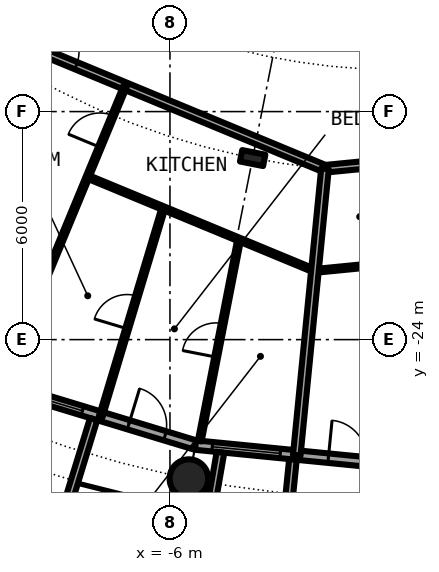
"""IFC4 building model, lengths in metres.
Left out: names, types, materials, properties, quantities, classifications, styles, units other than length and angle.
Written with IfcOpenShell. Run it as: python <this file> out.ifc"""

import sys

from ifc_helpers import new_model, si_unit, direction, frame, frame_2d, origin, origin_2d, place, context, subcontext, project, spatial, rectangle, circle, hollow_circle, i_section, extrude, element, fill, save


model = new_model("IFC4")
c1 = context("Model", 3, precision=1e-05, world=origin(), true_north=direction((0.0, 1.0)))
c2 = subcontext(c1, "Body", "Model", "MODEL_VIEW")
j1 = project(units=[si_unit("LENGTHUNIT", "METRE"), si_unit("PLANEANGLEUNIT", "RADIAN")], contexts=[c1])
p1 = place(None, origin())
s1 = spatial("IfcSite", under=j1, at=p1, CompositionType="ELEMENT")
p2 = place(p1, origin())
s2 = spatial("IfcBuilding", under=s1, at=p2, CompositionType="ELEMENT")
p3 = place(p2, frame((0.0, 0.0, 47.2)))
s3 = spatial("IfcBuildingStorey", under=s2, at=p3, CompositionType="ELEMENT", Elevation=47.2)
p4 = place(p3, frame((-5.501, -27.658, 0.0), z_axis=(0.0, 0.0, 1.0), x_axis=(1.0, 0.0, 0.0)))
e1 = element("IfcColumn", 1, at=p4, inside=s3, PredefinedType="COLUMN", context=c2, shape_type="SweptSolid", body=[
    extrude(hollow_circle(Radius=0.508, WallThickness=0.05, at=origin_2d()), origin(), (0.0, 0.0, 1.0), 3.05),
])
p5 = place(p3, frame((-3.824, -19.223, 0.0), z_axis=(0.0, 0.0, 1.0), x_axis=(-0.195090322016, -0.980785280403, 0.0)))
e2 = element("IfcColumn", 2, at=p5, inside=s3, PredefinedType="COLUMN", context=c2, shape_type="SweptSolid", body=[
    extrude(i_section(OverallWidth=0.305, OverallDepth=0.62, WebThickness=0.021, FlangeThickness=0.04, FilletRadius=0.027, at=origin_2d()), origin(), (0.0, 0.0, 1.0), 3.05),
])
p6 = place(p3, frame((-10.447, -25.222, 0.0), z_axis=(0.0, 0.0, 1.0), x_axis=(0.956965678721, -0.290201119486, 0.0)))
e3 = element("IfcWall", 3, at=p6, inside=s3, PredefinedType="SOLIDWALL", context=c2, shape_type="SweptSolid", body=[
    extrude(rectangle(XDim=5.351, YDim=0.25, at=frame_2d((2.676, 0.0))), origin(), (0.0, 0.0, 1.0), 2.7),
])
p7 = place(p6, frame((0.441, 0.0, 0.3)))
e4 = element("IfcOpeningElement", 4, at=p7, cuts=e3, PredefinedType="OPENING", context=c2, shape_type="SweptSolid", body=[
    extrude(rectangle(XDim=1.8, YDim=2.1, at=frame_2d((0.9, 1.05))), frame((0.0, 0.135, 0.0), z_axis=(0.0, -1.0, 0.0), x_axis=(1.0, 0.0, 0.0)), (0.0, 0.0, 1.0), 0.27),
])
p8 = place(p6, frame((3.51, 0.0, 0.0)))
e5 = element("IfcOpeningElement", 5, at=p8, cuts=e3, PredefinedType="OPENING", context=c2, shape_type="SweptSolid", body=[
    extrude(rectangle(XDim=1.0, YDim=2.2, at=frame_2d((0.5, 1.1))), frame((0.0, 0.135, 0.0), z_axis=(0.0, -1.0, 0.0), x_axis=(1.0, 0.0, 0.0)), (0.0, 0.0, 1.0), 0.27),
])
p9 = place(p3, frame((-11.638, -28.084, -0.03), z_axis=(0.0, 0.0, 1.0), x_axis=(0.941461077774, -0.337121697664, 0.0)))
e6 = element("IfcWall", 6, at=p9, inside=s3, PredefinedType="SOLIDWALL", context=c2, shape_type="SweptSolid", body=[
    extrude(rectangle(XDim=2.993, YDim=0.2, at=frame_2d((1.497, 0.0))), origin(), (0.0, 0.0, 1.0), 2.73),
])
p10 = place(p9, frame((0.457, 0.0, 0.33)))
e7 = element("IfcOpeningElement", 7, at=p10, cuts=e6, PredefinedType="OPENING", context=c2, shape_type="SweptSolid", body=[
    extrude(circle(Radius=1.04, at=frame_2d((1.04, 1.04))), frame((0.0, 0.11, 0.0), z_axis=(0.0, -1.0, 0.0), x_axis=(1.0, 0.0, 0.0)), (0.0, 0.0, 1.0), 0.22),
])
p11 = place(p3, frame((-8.009, -26.092, -0.03), z_axis=(0.0, 0.0, 1.0), x_axis=(-0.293406695073, -0.955987715029, 0.0)))
e8 = element("IfcWall", 8, at=p11, inside=s3, PredefinedType="SOLIDWALL", context=c2, shape_type="SweptSolid", body=[
    extrude(rectangle(XDim=3.006, YDim=0.2, at=frame_2d((1.503, 0.0))), origin(), (0.0, 0.0, 1.0), 2.73),
])
p12 = place(p3, frame((-5.326, -26.775, 0.0), z_axis=(0.0, 0.0, 1.0), x_axis=(0.995173996315, -0.098126026407, 0.0)))
e9 = element("IfcWall", 9, at=p12, inside=s3, PredefinedType="SOLIDWALL", context=c2, shape_type="SweptSolid", body=[
    extrude(rectangle(XDim=5.352, YDim=0.25, at=frame_2d((2.676, 0.0))), origin(), (0.0, 0.0, 1.0), 2.7),
])
p13 = place(p12, frame((0.441, 0.0, 0.3)))
e10 = element("IfcOpeningElement", 10, at=p13, cuts=e9, PredefinedType="OPENING", context=c2, shape_type="SweptSolid", body=[
    extrude(rectangle(XDim=1.8, YDim=2.1, at=frame_2d((0.9, 1.05))), frame((0.0, 0.135, 0.0), z_axis=(0.0, -1.0, 0.0), x_axis=(1.0, 0.0, 0.0)), (0.0, 0.0, 1.0), 0.27),
])
p14 = place(p12, frame((3.51, 0.0, 0.0)))
e11 = element("IfcOpeningElement", 11, at=p14, cuts=e9, PredefinedType="OPENING", context=c2, shape_type="SweptSolid", body=[
    extrude(rectangle(XDim=1.0, YDim=2.2, at=frame_2d((0.5, 1.1))), frame((0.0, 0.135, 0.0), z_axis=(0.0, -1.0, 0.0), x_axis=(1.0, 0.0, 0.0)), (0.0, 0.0, 1.0), 0.27),
])
p15 = place(p3, frame((-4.671, -26.966, -0.03), z_axis=(0.0, 0.0, 1.0), x_axis=(-0.170539878907, -0.985350774954, 0.0)))
e12 = element("IfcWall", 12, at=p15, inside=s3, PredefinedType="SOLIDWALL", context=c2, shape_type="SweptSolid", body=[
    extrude(rectangle(XDim=2.932, YDim=0.2, at=frame_2d((1.466, 0.0))), origin(), (0.0, 0.0, 1.0), 2.73),
])
p16 = place(p3, frame((-2.764, -27.153, -0.03), z_axis=(0.0, 0.0, 1.0), x_axis=(-0.101505487237, -0.994834979311, 0.0)))
e13 = element("IfcWall", 13, at=p16, inside=s3, PredefinedType="SOLIDWALL", context=c2, shape_type="SweptSolid", body=[
    extrude(rectangle(XDim=3.007, YDim=0.2, at=frame_2d((1.503, 0.0))), origin(), (0.0, 0.0, 1.0), 2.73),
])
p17 = place(p3, frame((-2.196, -22.193, 0.0), z_axis=(0.0, 0.0, 1.0), x_axis=(0.995193648169, 0.097926516552, 0.0)))
e14 = element("IfcWall", 14, at=p17, inside=s3, PredefinedType="PARTITIONING", context=c2, shape_type="SweptSolid", body=[
    extrude(rectangle(XDim=2.177, YDim=0.1, at=frame_2d((1.088, 0.0))), origin(), (0.0, 0.0, 1.0), 2.7),
])
p18 = place(p3, frame((-8.164, -19.716, 0.0), z_axis=(0.0, 0.0, 1.0), x_axis=(0.92387253274, -0.38270033087, 0.0)))
e15 = element("IfcWall", 15, at=p18, inside=s3, PredefinedType="PARTITIONING", context=c2, shape_type="SweptSolid", body=[
    extrude(rectangle(XDim=6.475, YDim=0.1, at=frame_2d((3.238, 0.0))), origin(), (0.0, 0.0, 1.0), 2.7),
])
p19 = place(p3, frame((-1.927, -19.506, 0.0), z_axis=(0.0, 0.0, 1.0), x_axis=(0.995181086618, 0.098054091383, 0.0)))
e16 = element("IfcWall", 16, at=p19, inside=s3, PredefinedType="PARTITIONING", context=c2, shape_type="SweptSolid", body=[
    extrude(rectangle(XDim=5.57, YDim=0.2, at=frame_2d((2.785, 0.0))), origin(), (0.0, 0.0, 1.0), 2.38),
])
p20 = place(p19, frame((4.168, 0.0, 0.0)))
e17 = element("IfcOpeningElement", 17, at=p20, cuts=e16, PredefinedType="OPENING", context=c2, shape_type="SweptSolid", body=[
    extrude(rectangle(XDim=1.0, YDim=2.3, at=frame_2d((0.5, 1.15))), frame((0.0, 0.11, 0.0), z_axis=(0.0, -1.0, 0.0), x_axis=(1.0, 0.0, 0.0)), (0.0, 0.0, 1.0), 0.22),
])
p21 = place(p3, frame((-12.434, -15.151, 0.0), z_axis=(0.0, 0.0, 1.0), x_axis=(0.923888467236, -0.382661861319, 0.0)))
e18 = element("IfcWall", 18, at=p21, inside=s3, PredefinedType="PARTITIONING", context=c2, shape_type="SweptSolid", body=[
    extrude(rectangle(XDim=11.381, YDim=0.2, at=frame_2d((5.691, 0.0))), origin(), (0.0, 0.0, 1.0), 2.7),
])
p22 = place(p21, frame((3.292, 0.0, 0.0)))
e19 = element("IfcOpeningElement", 19, at=p22, cuts=e18, PredefinedType="OPENING", context=c2, shape_type="SweptSolid", body=[
    extrude(rectangle(XDim=1.0, YDim=2.3, at=frame_2d((0.5, 1.15))), frame((0.0, 0.11, 0.0), z_axis=(0.0, -1.0, 0.0), x_axis=(1.0, 0.0, 0.0)), (0.0, 0.0, 1.0), 0.22),
])
p23 = place(p3, frame((-10.399, -25.106, 0.0), z_axis=(0.0, 0.0, 1.0), x_axis=(0.382697543868, 0.923873687209, 0.0)))
e20 = element("IfcWall", 20, at=p23, inside=s3, PredefinedType="PARTITIONING", context=c2, shape_type="SweptSolid", body=[
    extrude(rectangle(XDim=8.419, YDim=0.1, at=frame_2d((4.209, 0.0))), origin(), (0.0, 0.0, 1.0), 2.7),
])
p24 = place(p23, frame((6.677, 0.0, 0.0)))
e21 = element("IfcOpeningElement", 21, at=p24, cuts=e20, PredefinedType="OPENING", context=c2, shape_type="SweptSolid", body=[
    extrude(rectangle(XDim=0.9, YDim=2.3, at=frame_2d((0.45, 1.15))), frame((0.0, 0.06, 0.0), z_axis=(0.0, -1.0, 0.0), x_axis=(1.0, 0.0, 0.0)), (0.0, 0.0, 1.0), 0.12),
])
p25 = place(p23, frame((2.468, 0.0, 0.0)))
e22 = element("IfcOpeningElement", 22, at=p25, cuts=e20, PredefinedType="OPENING", context=c2, shape_type="SweptSolid", body=[
    extrude(rectangle(XDim=0.9, YDim=2.3, at=frame_2d((0.45, 1.15))), frame((0.0, 0.06, 0.0), z_axis=(0.0, -1.0, 0.0), x_axis=(1.0, 0.0, 0.0)), (0.0, 0.0, 1.0), 0.12),
])
p26 = place(p3, frame((-7.821, -26.025, 0.0), z_axis=(0.0, 0.0, 1.0), x_axis=(0.287793773423, 0.957692405723, 0.0)))
e23 = element("IfcWall", 23, at=p26, inside=s3, PredefinedType="PARTITIONING", context=c2, shape_type="SweptSolid", body=[
    extrude(rectangle(XDim=5.726, YDim=0.1, at=frame_2d((2.863, 0.0))), origin(), (0.0, 0.0, 1.0), 2.7),
])
p27 = place(p26, frame((2.413, 0.0, 0.0)))
e24 = element("IfcOpeningElement", 24, at=p27, cuts=e23, PredefinedType="OPENING", context=c2, shape_type="SweptSolid", body=[
    extrude(rectangle(XDim=0.9, YDim=2.3, at=frame_2d((0.45, 1.15))), frame((0.0, 0.06, 0.0), z_axis=(0.0, -1.0, 0.0), x_axis=(1.0, 0.0, 0.0)), (0.0, 0.0, 1.0), 0.12),
])
p28 = place(p3, frame((-5.217, -26.67, 0.0), z_axis=(0.0, 0.0, 1.0), x_axis=(0.192109041462, 0.981373586453, 0.0)))
e25 = element("IfcWall", 25, at=p28, inside=s3, PredefinedType="PARTITIONING", context=c2, shape_type="SweptSolid", body=[
    extrude(rectangle(XDim=5.404, YDim=0.1, at=frame_2d((2.702, 0.0))), origin(), (0.0, 0.0, 1.0), 2.7),
])
p29 = place(p28, frame((2.252, 0.0, 0.0)))
e26 = element("IfcOpeningElement", 26, at=p29, cuts=e25, PredefinedType="OPENING", context=c2, shape_type="SweptSolid", body=[
    extrude(rectangle(XDim=0.9, YDim=2.3, at=frame_2d((0.45, 1.15))), frame((0.0, 0.06, 0.0), z_axis=(0.0, -1.0, 0.0), x_axis=(1.0, 0.0, 0.0)), (0.0, 0.0, 1.0), 0.12),
])
p30 = place(p3, frame((-2.664, -27.044, 0.0), z_axis=(0.0, 0.0, 1.0), x_axis=(0.098115395479, 0.995175044487, 0.0)))
e27 = element("IfcWall", 27, at=p30, inside=s3, PredefinedType="PARTITIONING", context=c2, shape_type="SweptSolid", body=[
    extrude(rectangle(XDim=7.574, YDim=0.2, at=frame_2d((3.787, 0.0))), origin(), (0.0, 0.0, 1.0), 2.7),
])
p31 = place(p7, origin())
e28 = element("IfcWindow", 28, at=p31, inside=s3, PartitioningType="SINGLE_PANEL", PredefinedType="WINDOW", context=c2, shape_type="SweptSolid", body=[
    extrude(rectangle(XDim=1.8, YDim=2.1, at=frame_2d((0.9, 1.05))), frame((0.0, 0.03, 0.0), z_axis=(0.0, -1.0, 0.0), x_axis=(1.0, 0.0, 0.0)), (0.0, 0.0, 1.0), 0.06),
])
fill(e4, e28)
p32 = place(p8, origin())
e29 = element("IfcDoor", 29, at=p32, inside=s3, OperationType="SINGLE_SWING_LEFT", PredefinedType="DOOR", context=c2, shape_type="SweptSolid", body=[
    extrude(rectangle(XDim=1.0, YDim=2.2, at=frame_2d((0.5, 1.1))), frame((0.0, 0.025, 0.0), z_axis=(0.0, -1.0, 0.0), x_axis=(1.0, 0.0, 0.0)), (0.0, 0.0, 1.0), 0.05),
])
fill(e5, e29)
p33 = place(p13, origin())
e30 = element("IfcWindow", 30, at=p33, inside=s3, PartitioningType="SINGLE_PANEL", PredefinedType="WINDOW", context=c2, shape_type="SweptSolid", body=[
    extrude(rectangle(XDim=1.8, YDim=2.1, at=frame_2d((0.9, 1.05))), frame((0.0, 0.03, 0.0), z_axis=(0.0, -1.0, 0.0), x_axis=(1.0, 0.0, 0.0)), (0.0, 0.0, 1.0), 0.06),
])
fill(e10, e30)
p34 = place(p14, origin())
e31 = element("IfcDoor", 31, at=p34, inside=s3, OperationType="SINGLE_SWING_LEFT", PredefinedType="DOOR", context=c2, shape_type="SweptSolid", body=[
    extrude(rectangle(XDim=1.0, YDim=2.2, at=frame_2d((0.5, 1.1))), frame((0.0, 0.025, 0.0), z_axis=(0.0, -1.0, 0.0), x_axis=(1.0, 0.0, 0.0)), (0.0, 0.0, 1.0), 0.05),
])
fill(e11, e31)
p35 = place(p22, origin())
e32 = element("IfcDoor", 32, at=p35, inside=s3, OperationType="SINGLE_SWING_LEFT", PredefinedType="DOOR", context=c2, shape_type="SweptSolid", body=[
    extrude(rectangle(XDim=1.0, YDim=2.3, at=frame_2d((0.5, 1.15))), frame((0.0, 0.025, 0.0), z_axis=(0.0, -1.0, 0.0), x_axis=(1.0, 0.0, 0.0)), (0.0, 0.0, 1.0), 0.05),
])
fill(e19, e32)
p36 = place(p24, origin())
e33 = element("IfcDoor", 33, at=p36, inside=s3, OperationType="SINGLE_SWING_RIGHT", PredefinedType="DOOR", context=c2, shape_type="SweptSolid", body=[
    extrude(rectangle(XDim=0.9, YDim=2.3, at=frame_2d((0.45, 1.15))), frame((0.0, 0.025, 0.0), z_axis=(0.0, -1.0, 0.0), x_axis=(1.0, 0.0, 0.0)), (0.0, 0.0, 1.0), 0.05),
])
fill(e21, e33)
p37 = place(p25, origin())
e34 = element("IfcDoor", 34, at=p37, inside=s3, OperationType="SINGLE_SWING_LEFT", PredefinedType="DOOR", context=c2, shape_type="SweptSolid", body=[
    extrude(rectangle(XDim=0.9, YDim=2.3, at=frame_2d((0.45, 1.15))), frame((0.0, 0.025, 0.0), z_axis=(0.0, -1.0, 0.0), x_axis=(1.0, 0.0, 0.0)), (0.0, 0.0, 1.0), 0.05),
])
fill(e22, e34)
p38 = place(p27, origin())
e35 = element("IfcDoor", 35, at=p38, inside=s3, OperationType="SINGLE_SWING_LEFT", PredefinedType="DOOR", context=c2, shape_type="SweptSolid", body=[
    extrude(rectangle(XDim=0.9, YDim=2.3, at=frame_2d((0.45, 1.15))), frame((0.0, 0.025, 0.0), z_axis=(0.0, -1.0, 0.0), x_axis=(1.0, 0.0, 0.0)), (0.0, 0.0, 1.0), 0.05),
])
fill(e24, e35)
p39 = place(p29, origin())
e36 = element("IfcDoor", 36, at=p39, inside=s3, OperationType="SINGLE_SWING_RIGHT", PredefinedType="DOOR", context=c2, shape_type="SweptSolid", body=[
    extrude(rectangle(XDim=0.9, YDim=2.3, at=frame_2d((0.45, 1.15))), frame((0.0, 0.025, 0.0), z_axis=(0.0, -1.0, 0.0), x_axis=(1.0, 0.0, 0.0)), (0.0, 0.0, 1.0), 0.05),
])
fill(e26, e36)
save(model, sys.argv[1])
